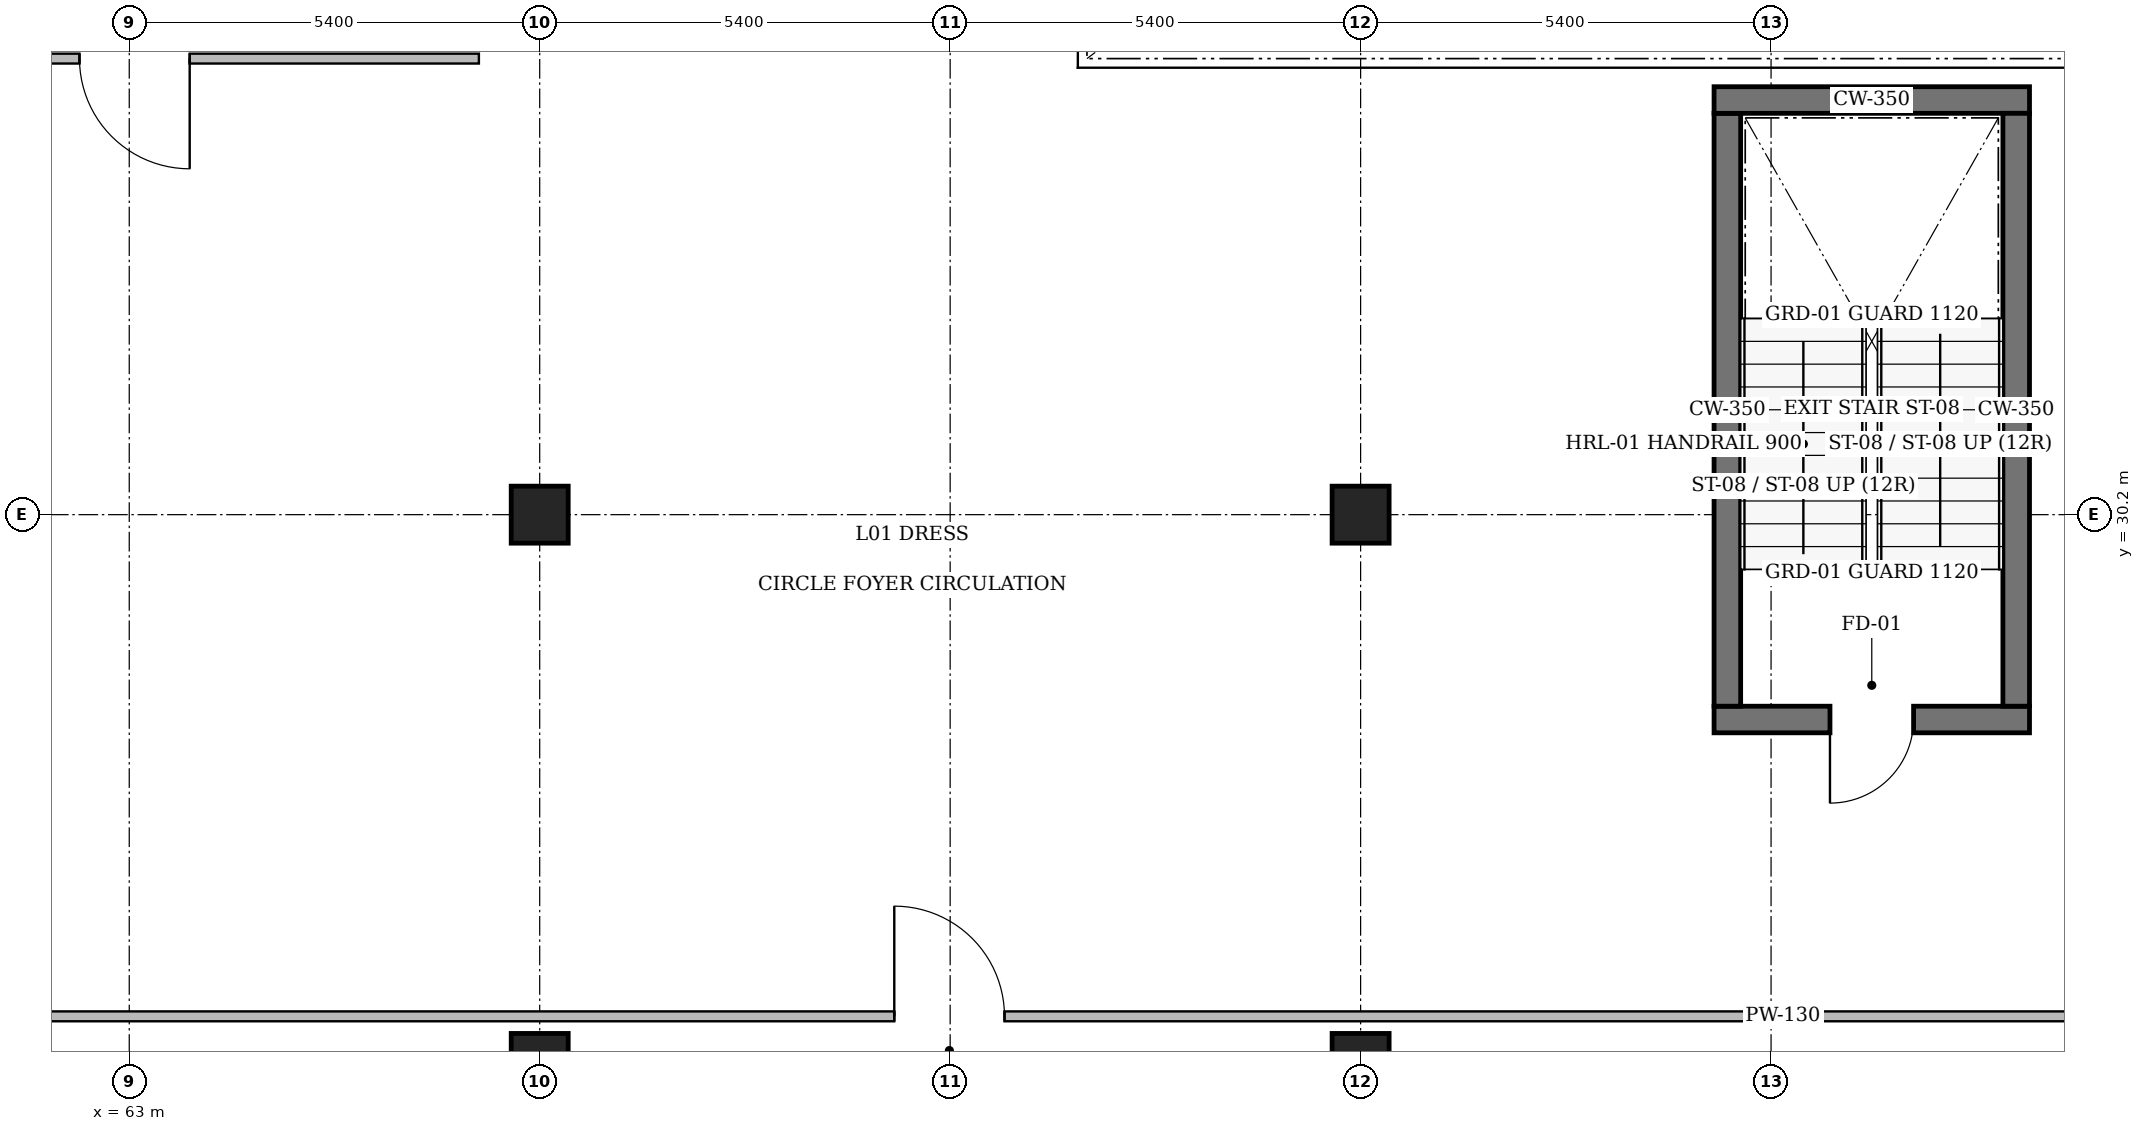
"""IFC4 building model, lengths in metres.
Left out: names, types, materials, properties, quantities, classifications, styles, units other than length and angle.
Written with IfcOpenShell. Run it as: python <this file> out.ifc"""

import sys

from ifc_helpers import new_model, si_unit, direction, frame, frame_2d, origin, origin_2d, place, context, subcontext, project, spatial, rectangle, circle, extrude, element, fill, save


model = new_model("IFC4")
c1 = context("Model", 3, precision=1e-05, world=origin(), true_north=direction((0.0, 1.0)))
c2 = subcontext(c1, "Body", "Model", "MODEL_VIEW")
j1 = project(units=[si_unit("LENGTHUNIT", "METRE"), si_unit("PLANEANGLEUNIT", "RADIAN")], contexts=[c1])
p1 = place(None, origin())
s1 = spatial("IfcSite", under=j1, at=p1, CompositionType="ELEMENT")
p2 = place(p1, origin())
s2 = spatial("IfcBuilding", under=s1, at=p2, CompositionType="ELEMENT")
p3 = place(p2, frame((0.0, 0.0, 4.8)))
s3 = spatial("IfcBuildingStorey", under=s2, at=p3, CompositionType="ELEMENT", Elevation=4.8)
for number, where, z_axis, x_axis in (
    (1, (68.4, 23.0, 0.0), (0.0, 0.0, 1.0), (1.0, 0.0, 0.0)),
    (2, (68.4, 30.2, 0.0), (0.0, 0.0, 1.0), (1.0, 0.0, 0.0)),
    (3, (79.2, 23.0, 0.0), (0.0, 0.0, 1.0), (1.0, 0.0, 0.0)),
    (4, (79.2, 30.2, 0.0), (0.0, 0.0, 1.0), (1.0, 0.0, 0.0)),
):
    element("IfcColumn", number, at=place(p3, frame(where, z_axis=z_axis, x_axis=x_axis)), inside=s3, PredefinedType="COLUMN", context=c2, shape_type="SweptSolid", body=[
        extrude(circle(Radius=0.375, at=origin_2d()), origin(), (0.0, 0.0, 1.0), 4.2),
    ])
p4 = place(p3, frame((88.0, 27.505, 0.0), z_axis=(0.0, 0.0, 1.0), x_axis=(-1.0, 0.0, 0.0)))
e5 = element("IfcWall", 5, at=p4, inside=s3, PredefinedType="SOLIDWALL", context=c2, shape_type="SweptSolid", body=[
    extrude(rectangle(XDim=4.15, YDim=0.35, at=frame_2d((2.075, 0.0))), origin(), (0.0, 0.0, 1.0), 4.2),
])
p5 = place(p4, frame((1.525, 0.0, 0.0)))
e6 = element("IfcOpeningElement", 6, at=p5, cuts=e5, PredefinedType="OPENING", context=c2, shape_type="SweptSolid", body=[
    extrude(rectangle(XDim=1.1, YDim=2.15, at=frame_2d((0.55, 1.075))), frame((0.0, 0.195, 0.0), z_axis=(0.0, -1.0, 0.0), x_axis=(1.0, 0.0, 0.0)), (0.0, 0.0, 1.0), 0.39),
])
p6 = place(p3, frame((84.025, 27.68, 0.0), z_axis=(0.0, 0.0, 1.0), x_axis=(0.0, 1.0, 0.0)))
e7 = element("IfcWall", 7, at=p6, inside=s3, PredefinedType="SOLIDWALL", context=c2, shape_type="SweptSolid", body=[
    extrude(rectangle(XDim=7.8, YDim=0.35, at=frame_2d((3.9, 0.0))), origin(), (0.0, 0.0, 1.0), 4.2),
])
p7 = place(p3, frame((83.85, 35.655, 0.0), z_axis=(0.0, 0.0, 1.0), x_axis=(1.0, 0.0, 0.0)))
e8 = element("IfcWall", 8, at=p7, inside=s3, PredefinedType="SOLIDWALL", context=c2, shape_type="SweptSolid", body=[
    extrude(rectangle(XDim=4.15, YDim=0.35, at=frame_2d((2.075, 0.0))), origin(), (0.0, 0.0, 1.0), 4.2),
])
p8 = place(p3, frame((87.825, 35.48, 0.0), z_axis=(0.0, 0.0, 1.0), x_axis=(0.0, -1.0, 0.0)))
e9 = element("IfcWall", 9, at=p8, inside=s3, PredefinedType="SOLIDWALL", context=c2, shape_type="SweptSolid", body=[
    extrude(rectangle(XDim=7.8, YDim=0.35, at=frame_2d((3.9, 0.0))), origin(), (0.0, 0.0, 1.0), 4.2),
])
p9 = place(p3, frame((57.8, 23.6, 0.0), z_axis=(0.0, 0.0, 1.0), x_axis=(1.0, 0.0, 0.0)))
e10 = element("IfcWall", 10, at=p9, inside=s3, PredefinedType="PARTITIONING", context=c2, shape_type="SweptSolid", body=[
    extrude(rectangle(XDim=37.2, YDim=0.13, at=frame_2d((18.6, 0.0))), origin(), (0.0, 0.0, 1.0), 3.94),
])
p10 = place(p9, frame((15.265, 0.0, 0.0)))
e11 = element("IfcOpeningElement", 11, at=p10, cuts=e10, PredefinedType="OPENING", context=c2, shape_type="SweptSolid", body=[
    extrude(rectangle(XDim=1.45, YDim=2.2, at=frame_2d((0.725, 1.1))), frame((0.0, 0.085, 0.0), z_axis=(0.0, -1.0, 0.0), x_axis=(1.0, 0.0, 0.0)), (0.0, 0.0, 1.0), 0.17),
])
p11 = place(p3, frame((67.6, 36.2, 0.0), z_axis=(0.0, 0.0, 1.0), x_axis=(-1.0, 0.0, 0.0)))
e12 = element("IfcWall", 12, at=p11, inside=s3, PredefinedType="PARTITIONING", context=c2, shape_type="SweptSolid", body=[
    extrude(rectangle(XDim=9.8, YDim=0.13, at=frame_2d((4.9, 0.0))), origin(), (0.0, 0.0, 1.0), 3.94),
])
p12 = place(p11, frame((3.805, 0.0, 0.0)))
e13 = element("IfcOpeningElement", 13, at=p12, cuts=e12, PredefinedType="OPENING", context=c2, shape_type="SweptSolid", body=[
    extrude(rectangle(XDim=1.45, YDim=2.2, at=frame_2d((0.725, 1.1))), frame((0.0, 0.085, 0.0), z_axis=(0.0, -1.0, 0.0), x_axis=(1.0, 0.0, 0.0)), (0.0, 0.0, 1.0), 0.17),
])
p13 = place(p5, origin())
e14 = element("IfcDoor", 14, at=p13, inside=s3, OperationType="SINGLE_SWING_RIGHT", PredefinedType="DOOR", context=c2, shape_type="SweptSolid", body=[
    extrude(rectangle(XDim=1.1, YDim=2.15, at=frame_2d((0.55, 1.075))), frame((0.0, 0.025, 0.0), z_axis=(0.0, -1.0, 0.0), x_axis=(1.0, 0.0, 0.0)), (0.0, 0.0, 1.0), 0.05),
])
fill(e6, e14)
p14 = place(p10, origin())
e15 = element("IfcDoor", 15, at=p14, inside=s3, OperationType="DOUBLE_DOOR_SINGLE_SWING", PredefinedType="DOOR", context=c2, shape_type="SweptSolid", body=[
    extrude(rectangle(XDim=1.45, YDim=2.2, at=frame_2d((0.725, 1.1))), frame((0.0, 0.025, 0.0), z_axis=(0.0, -1.0, 0.0), x_axis=(1.0, 0.0, 0.0)), (0.0, 0.0, 1.0), 0.05),
])
fill(e11, e15)
p15 = place(p12, origin())
e16 = element("IfcDoor", 16, at=p15, inside=s3, OperationType="DOUBLE_DOOR_SINGLE_SWING", PredefinedType="DOOR", context=c2, shape_type="SweptSolid", body=[
    extrude(rectangle(XDim=1.45, YDim=2.2, at=frame_2d((0.725, 1.1))), frame((0.0, 0.025, 0.0), z_axis=(0.0, -1.0, 0.0), x_axis=(1.0, 0.0, 0.0)), (0.0, 0.0, 1.0), 0.05),
])
fill(e13, e16)
save(model, sys.argv[1])
